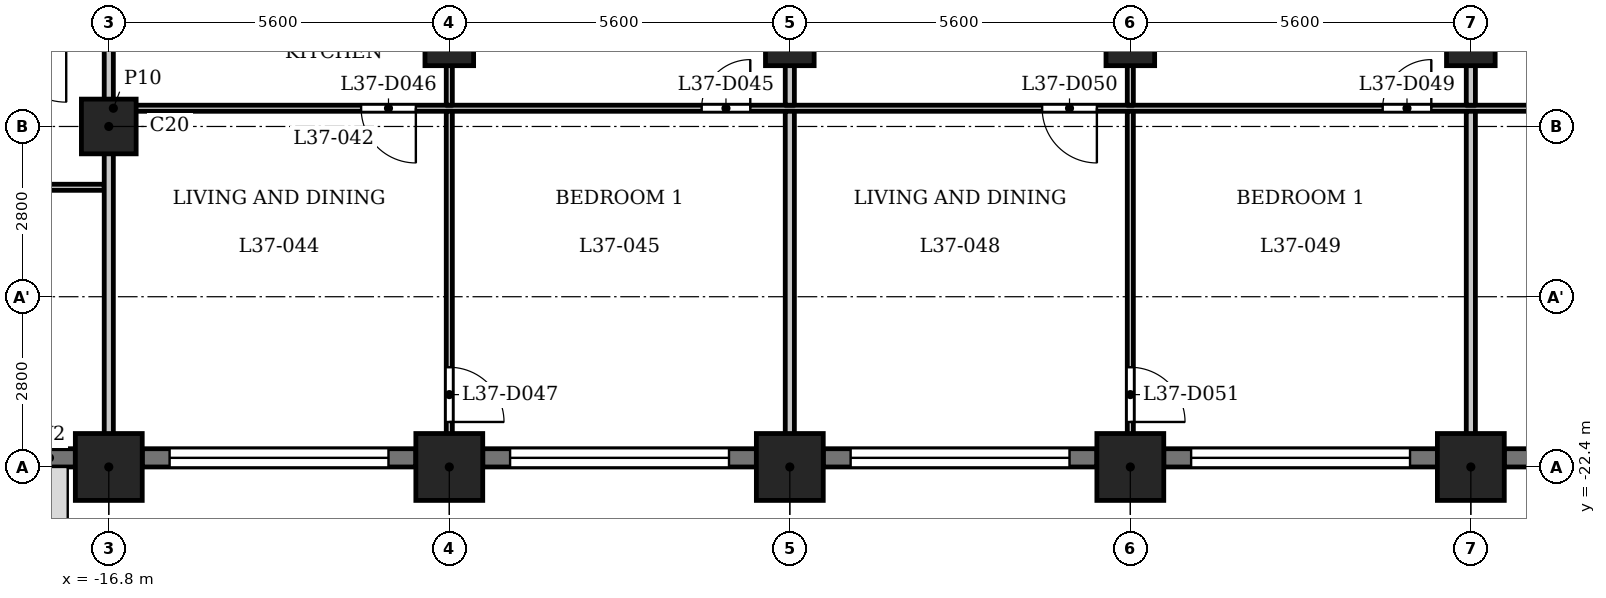
"""IFC4 building model, lengths in metres.
Left out: names, types, materials, properties, quantities, classifications, styles, units other than length and angle.
Written with IfcOpenShell. Run it as: python <this file> out.ifc"""

import sys

from ifc_helpers import new_model, si_unit, direction, frame, frame_2d, origin, origin_2d, place, context, subcontext, project, spatial, rectangle, extrude, element, fill, save


model = new_model("IFC4")
c1 = context("Model", 3, precision=1e-05, world=origin(), true_north=direction((0.0, 1.0)))
c2 = subcontext(c1, "Body", "Model", "MODEL_VIEW")
j1 = project(units=[si_unit("LENGTHUNIT", "METRE"), si_unit("PLANEANGLEUNIT", "RADIAN")], contexts=[c1])
p1 = place(None, origin())
s1 = spatial("IfcSite", under=j1, at=p1, CompositionType="ELEMENT")
p2 = place(p1, origin())
s2 = spatial("IfcBuilding", under=s1, at=p2, CompositionType="ELEMENT")
p3 = place(p2, frame((0.0, 0.0, 146.6)))
s3 = spatial("IfcBuildingStorey", under=s2, at=p3, CompositionType="ELEMENT", Elevation=146.6)
for number, where, z_axis, x_axis in (
    (1, (-16.8, -22.4, 0.0), (0.0, 0.0, 1.0), (1.0, 0.0, 0.0)),
    (2, (-11.2, -22.4, 0.0), (0.0, 0.0, 1.0), (1.0, 0.0, 0.0)),
    (3, (-5.6, -22.4, 0.0), (0.0, 0.0, 1.0), (1.0, 0.0, 0.0)),
    (4, (0.0, -22.4, 0.0), (0.0, 0.0, 1.0), (1.0, 0.0, 0.0)),
    (5, (5.6, -22.4, 0.0), (0.0, 0.0, 1.0), (1.0, 0.0, 0.0)),
):
    element("IfcColumn", number, at=place(p3, frame(where, z_axis=z_axis, x_axis=x_axis)), inside=s3, PredefinedType="COLUMN", context=c2, shape_type="SweptSolid", body=[
        extrude(rectangle(XDim=1.1, YDim=1.1, at=origin_2d()), origin(), (0.0, 0.0, 1.0), 3.5),
    ])
p4 = place(p3, frame((-16.8, -16.8, 0.0), z_axis=(0.0, 0.0, 1.0), x_axis=(1.0, 0.0, 0.0)))
e6 = element("IfcColumn", 6, at=p4, inside=s3, PredefinedType="COLUMN", context=c2, shape_type="SweptSolid", body=[
    extrude(rectangle(XDim=0.9, YDim=0.9, at=origin_2d()), origin(), (0.0, 0.0, 1.0), 3.5),
])
for number, where, z_axis, x_axis in (
    (7, (-11.2, -15.4, 0.0), (0.0, 0.0, 1.0), (1.0, 0.0, 0.0)),
    (8, (-5.6, -15.4, 0.0), (0.0, 0.0, 1.0), (1.0, 0.0, 0.0)),
    (9, (0.0, -15.4, 0.0), (0.0, 0.0, 1.0), (1.0, 0.0, 0.0)),
    (10, (5.6, -15.4, 0.0), (0.0, 0.0, 1.0), (1.0, 0.0, 0.0)),
):
    element("IfcColumn", number, at=place(p3, frame(where, z_axis=z_axis, x_axis=x_axis)), inside=s3, PredefinedType="COLUMN", context=c2, shape_type="SweptSolid", body=[
        extrude(rectangle(XDim=0.8, YDim=0.8, at=origin_2d()), origin(), (0.0, 0.0, 1.0), 3.5),
    ])
p5 = place(p3, frame((-20.0, -22.25, 0.0), z_axis=(0.0, 0.0, 1.0), x_axis=(1.0, 0.0, 0.0)))
e11 = element("IfcWall", 11, at=p5, inside=s3, PredefinedType="SOLIDWALL", context=c2, shape_type="SweptSolid", body=[
    extrude(rectangle(XDim=2.65, YDim=0.3, at=frame_2d((1.325, 0.0))), origin(), (0.0, 0.0, 1.0), 2.45),
])
p6 = place(p5, frame((0.425, 0.0, 0.9)))
e12 = element("IfcOpeningElement", 12, at=p6, cuts=e11, PredefinedType="OPENING", context=c2, shape_type="SweptSolid", body=[
    extrude(rectangle(XDim=1.8, YDim=1.25, at=frame_2d((0.9, 0.625))), frame((0.0, 0.16, 0.0), z_axis=(0.0, -1.0, 0.0), x_axis=(1.0, 0.0, 0.0)), (0.0, 0.0, 1.0), 0.32),
])
p7 = place(p3, frame((-16.25, -22.25, 0.0), z_axis=(0.0, 0.0, 1.0), x_axis=(1.0, 0.0, 0.0)))
e13 = element("IfcWall", 13, at=p7, inside=s3, PredefinedType="SOLIDWALL", context=c2, shape_type="SweptSolid", body=[
    extrude(rectangle(XDim=4.5, YDim=0.3, at=frame_2d((2.25, 0.0))), origin(), (0.0, 0.0, 1.0), 2.45),
])
p8 = place(p7, frame((0.45, 0.0, 1.2)))
e14 = element("IfcOpeningElement", 14, at=p8, cuts=e13, PredefinedType="OPENING", context=c2, shape_type="SweptSolid", body=[
    extrude(rectangle(XDim=3.6, YDim=0.95, at=frame_2d((1.8, 0.475))), frame((0.0, 0.16, 0.0), z_axis=(0.0, -1.0, 0.0), x_axis=(1.0, 0.0, 0.0)), (0.0, 0.0, 1.0), 0.32),
])
p9 = place(p3, frame((-10.65, -22.25, 0.0), z_axis=(0.0, 0.0, 1.0), x_axis=(1.0, 0.0, 0.0)))
e15 = element("IfcWall", 15, at=p9, inside=s3, PredefinedType="SOLIDWALL", context=c2, shape_type="SweptSolid", body=[
    extrude(rectangle(XDim=4.5, YDim=0.3, at=frame_2d((2.25, 0.0))), origin(), (0.0, 0.0, 1.0), 2.45),
])
p10 = place(p9, frame((0.45, 0.0, 1.2)))
e16 = element("IfcOpeningElement", 16, at=p10, cuts=e15, PredefinedType="OPENING", context=c2, shape_type="SweptSolid", body=[
    extrude(rectangle(XDim=3.6, YDim=0.95, at=frame_2d((1.8, 0.475))), frame((0.0, 0.16, 0.0), z_axis=(0.0, -1.0, 0.0), x_axis=(1.0, 0.0, 0.0)), (0.0, 0.0, 1.0), 0.32),
])
p11 = place(p3, frame((-5.05, -22.25, 0.0), z_axis=(0.0, 0.0, 1.0), x_axis=(1.0, 0.0, 0.0)))
e17 = element("IfcWall", 17, at=p11, inside=s3, PredefinedType="SOLIDWALL", context=c2, shape_type="SweptSolid", body=[
    extrude(rectangle(XDim=4.5, YDim=0.3, at=frame_2d((2.25, 0.0))), origin(), (0.0, 0.0, 1.0), 2.45),
])
p12 = place(p11, frame((0.45, 0.0, 1.2)))
e18 = element("IfcOpeningElement", 18, at=p12, cuts=e17, PredefinedType="OPENING", context=c2, shape_type="SweptSolid", body=[
    extrude(rectangle(XDim=3.6, YDim=0.95, at=frame_2d((1.8, 0.475))), frame((0.0, 0.16, 0.0), z_axis=(0.0, -1.0, 0.0), x_axis=(1.0, 0.0, 0.0)), (0.0, 0.0, 1.0), 0.32),
])
p13 = place(p3, frame((0.55, -22.25, 0.0), z_axis=(0.0, 0.0, 1.0), x_axis=(1.0, 0.0, 0.0)))
e19 = element("IfcWall", 19, at=p13, inside=s3, PredefinedType="SOLIDWALL", context=c2, shape_type="SweptSolid", body=[
    extrude(rectangle(XDim=4.5, YDim=0.3, at=frame_2d((2.25, 0.0))), origin(), (0.0, 0.0, 1.0), 2.45),
])
p14 = place(p13, frame((0.45, 0.0, 1.2)))
e20 = element("IfcOpeningElement", 20, at=p14, cuts=e19, PredefinedType="OPENING", context=c2, shape_type="SweptSolid", body=[
    extrude(rectangle(XDim=3.6, YDim=0.95, at=frame_2d((1.8, 0.475))), frame((0.0, 0.16, 0.0), z_axis=(0.0, -1.0, 0.0), x_axis=(1.0, 0.0, 0.0)), (0.0, 0.0, 1.0), 0.32),
])
p15 = place(p3, frame((6.15, -22.25, 0.0), z_axis=(0.0, 0.0, 1.0), x_axis=(1.0, 0.0, 0.0)))
e21 = element("IfcWall", 21, at=p15, inside=s3, PredefinedType="SOLIDWALL", context=c2, shape_type="SweptSolid", body=[
    extrude(rectangle(XDim=4.5, YDim=0.3, at=frame_2d((2.25, 0.0))), origin(), (0.0, 0.0, 1.0), 2.45),
])
p16 = place(p15, frame((0.45, 0.0, 1.2)))
e22 = element("IfcOpeningElement", 22, at=p16, cuts=e21, PredefinedType="OPENING", context=c2, shape_type="SweptSolid", body=[
    extrude(rectangle(XDim=3.6, YDim=0.95, at=frame_2d((1.8, 0.475))), frame((0.0, 0.16, 0.0), z_axis=(0.0, -1.0, 0.0), x_axis=(1.0, 0.0, 0.0)), (0.0, 0.0, 1.0), 0.32),
])
p17 = place(p3, frame((-26.394, -17.8, 0.0), z_axis=(0.0, 0.0, 1.0), x_axis=(1.0, 0.0, 0.0)))
e23 = element("IfcWall", 23, at=p17, inside=s3, PredefinedType="PARTITIONING", context=c2, shape_type="SweptSolid", body=[
    extrude(rectangle(XDim=9.519, YDim=0.1, at=frame_2d((4.76, 0.0))), origin(), (0.0, 0.0, 1.0), 3.2),
])
p18 = place(p17, frame((2.544, 0.0, 0.0)))
e24 = element("IfcOpeningElement", 24, at=p18, cuts=e23, PredefinedType="OPENING", context=c2, shape_type="SweptSolid", body=[
    extrude(rectangle(XDim=0.8, YDim=2.1, at=frame_2d((0.4, 1.05))), frame((0.0, 0.06, 0.0), z_axis=(0.0, -1.0, 0.0), x_axis=(1.0, 0.0, 0.0)), (0.0, 0.0, 1.0), 0.12),
])
p19 = place(p17, frame((6.894, 0.0, 0.0)))
e25 = element("IfcOpeningElement", 25, at=p19, cuts=e23, PredefinedType="OPENING", context=c2, shape_type="SweptSolid", body=[
    extrude(rectangle(XDim=0.9, YDim=2.1, at=frame_2d((0.45, 1.05))), frame((0.0, 0.06, 0.0), z_axis=(0.0, -1.0, 0.0), x_axis=(1.0, 0.0, 0.0)), (0.0, 0.0, 1.0), 0.12),
])
p20 = place(p3, frame((-16.725, -16.5, 0.0), z_axis=(0.0, 0.0, 1.0), x_axis=(1.0, 0.0, 0.0)))
e26 = element("IfcWall", 26, at=p20, inside=s3, PredefinedType="PARTITIONING", context=c2, shape_type="SweptSolid", body=[
    extrude(rectangle(XDim=33.45, YDim=0.1, at=frame_2d((16.725, 0.0))), origin(), (0.0, 0.0, 1.0), 3.2),
])
p21 = place(p20, frame((9.675, 0.0, 0.0)))
e27 = element("IfcOpeningElement", 27, at=p21, cuts=e26, PredefinedType="OPENING", context=c2, shape_type="SweptSolid", body=[
    extrude(rectangle(XDim=0.8, YDim=2.1, at=frame_2d((0.4, 1.05))), frame((0.0, 0.06, 0.0), z_axis=(0.0, -1.0, 0.0), x_axis=(1.0, 0.0, 0.0)), (0.0, 0.0, 1.0), 0.12),
])
p22 = place(p20, frame((4.075, 0.0, 0.0)))
e28 = element("IfcOpeningElement", 28, at=p22, cuts=e26, PredefinedType="OPENING", context=c2, shape_type="SweptSolid", body=[
    extrude(rectangle(XDim=0.9, YDim=2.1, at=frame_2d((0.45, 1.05))), frame((0.0, 0.06, 0.0), z_axis=(0.0, -1.0, 0.0), x_axis=(1.0, 0.0, 0.0)), (0.0, 0.0, 1.0), 0.12),
])
p23 = place(p20, frame((20.875, 0.0, 0.0)))
e29 = element("IfcOpeningElement", 29, at=p23, cuts=e26, PredefinedType="OPENING", context=c2, shape_type="SweptSolid", body=[
    extrude(rectangle(XDim=0.8, YDim=2.1, at=frame_2d((0.4, 1.05))), frame((0.0, 0.06, 0.0), z_axis=(0.0, -1.0, 0.0), x_axis=(1.0, 0.0, 0.0)), (0.0, 0.0, 1.0), 0.12),
])
p24 = place(p20, frame((15.275, 0.0, 0.0)))
e30 = element("IfcOpeningElement", 30, at=p24, cuts=e26, PredefinedType="OPENING", context=c2, shape_type="SweptSolid", body=[
    extrude(rectangle(XDim=0.9, YDim=2.1, at=frame_2d((0.45, 1.05))), frame((0.0, 0.06, 0.0), z_axis=(0.0, -1.0, 0.0), x_axis=(1.0, 0.0, 0.0)), (0.0, 0.0, 1.0), 0.12),
])
p25 = place(p20, frame((26.475, 0.0, 0.0)))
e31 = element("IfcOpeningElement", 31, at=p25, cuts=e26, PredefinedType="OPENING", context=c2, shape_type="SweptSolid", body=[
    extrude(rectangle(XDim=0.8, YDim=2.1, at=frame_2d((0.4, 1.05))), frame((0.0, 0.06, 0.0), z_axis=(0.0, -1.0, 0.0), x_axis=(1.0, 0.0, 0.0)), (0.0, 0.0, 1.0), 0.12),
])
p26 = place(p20, frame((30.575, 0.0, 0.0)))
e32 = element("IfcOpeningElement", 32, at=p26, cuts=e26, PredefinedType="OPENING", context=c2, shape_type="SweptSolid", body=[
    extrude(rectangle(XDim=0.9, YDim=2.1, at=frame_2d((0.45, 1.05))), frame((0.0, 0.06, 0.0), z_axis=(0.0, -1.0, 0.0), x_axis=(1.0, 0.0, 0.0)), (0.0, 0.0, 1.0), 0.12),
])
p27 = place(p3, frame((-16.8, -22.93, 0.0), z_axis=(0.0, 0.0, 1.0), x_axis=(0.0, 1.0, 0.0)))
e33 = element("IfcWall", 33, at=p27, inside=s3, PredefinedType="PARTITIONING", context=c2, shape_type="SweptSolid", body=[
    extrude(rectangle(XDim=7.455, YDim=0.15, at=frame_2d((3.728, 0.0))), origin(), (0.0, 0.0, 1.0), 3.2),
])
p28 = place(p3, frame((-11.2, -22.93, 0.0), z_axis=(0.0, 0.0, 1.0), x_axis=(0.0, 1.0, 0.0)))
e34 = element("IfcWall", 34, at=p28, inside=s3, PredefinedType="PARTITIONING", context=c2, shape_type="SweptSolid", body=[
    extrude(rectangle(XDim=6.38, YDim=0.1, at=frame_2d((3.19, 0.0))), origin(), (0.0, 0.0, 1.0), 3.2),
])
p29 = place(p28, frame((1.27, 0.0, 0.0)))
e35 = element("IfcOpeningElement", 35, at=p29, cuts=e34, PredefinedType="OPENING", context=c2, shape_type="SweptSolid", body=[
    extrude(rectangle(XDim=0.9, YDim=2.1, at=frame_2d((0.45, 1.05))), frame((0.0, 0.06, 0.0), z_axis=(0.0, -1.0, 0.0), x_axis=(1.0, 0.0, 0.0)), (0.0, 0.0, 1.0), 0.12),
])
p30 = place(p3, frame((-11.2, -16.45, 0.0), z_axis=(0.0, 0.0, 1.0), x_axis=(0.0, 1.0, 0.0)))
e36 = element("IfcWall", 36, at=p30, inside=s3, PredefinedType="PARTITIONING", context=c2, shape_type="SweptSolid", body=[
    extrude(rectangle(XDim=3.175, YDim=0.1, at=frame_2d((1.587, 0.0))), origin(), (0.0, 0.0, 1.0), 3.2),
])
p31 = place(p3, frame((-5.6, -22.93, 0.0), z_axis=(0.0, 0.0, 1.0), x_axis=(0.0, 1.0, 0.0)))
e37 = element("IfcWall", 37, at=p31, inside=s3, PredefinedType="PARTITIONING", context=c2, shape_type="SweptSolid", body=[
    extrude(rectangle(XDim=6.38, YDim=0.15, at=frame_2d((3.19, 0.0))), origin(), (0.0, 0.0, 1.0), 3.2),
])
p32 = place(p3, frame((-5.6, -16.45, 0.0), z_axis=(0.0, 0.0, 1.0), x_axis=(0.0, 1.0, 0.0)))
e38 = element("IfcWall", 38, at=p32, inside=s3, PredefinedType="PARTITIONING", context=c2, shape_type="SweptSolid", body=[
    extrude(rectangle(XDim=3.175, YDim=0.15, at=frame_2d((1.587, 0.0))), origin(), (0.0, 0.0, 1.0), 3.2),
])
p33 = place(p3, frame((0.0, -22.93, 0.0), z_axis=(0.0, 0.0, 1.0), x_axis=(0.0, 1.0, 0.0)))
e39 = element("IfcWall", 39, at=p33, inside=s3, PredefinedType="PARTITIONING", context=c2, shape_type="SweptSolid", body=[
    extrude(rectangle(XDim=6.38, YDim=0.1, at=frame_2d((3.19, 0.0))), origin(), (0.0, 0.0, 1.0), 3.2),
])
p34 = place(p33, frame((1.27, 0.0, 0.0)))
e40 = element("IfcOpeningElement", 40, at=p34, cuts=e39, PredefinedType="OPENING", context=c2, shape_type="SweptSolid", body=[
    extrude(rectangle(XDim=0.9, YDim=2.1, at=frame_2d((0.45, 1.05))), frame((0.0, 0.06, 0.0), z_axis=(0.0, -1.0, 0.0), x_axis=(1.0, 0.0, 0.0)), (0.0, 0.0, 1.0), 0.12),
])
p35 = place(p3, frame((0.0, -16.45, 0.0), z_axis=(0.0, 0.0, 1.0), x_axis=(0.0, 1.0, 0.0)))
e41 = element("IfcWall", 41, at=p35, inside=s3, PredefinedType="PARTITIONING", context=c2, shape_type="SweptSolid", body=[
    extrude(rectangle(XDim=3.175, YDim=0.1, at=frame_2d((1.587, 0.0))), origin(), (0.0, 0.0, 1.0), 3.2),
])
p36 = place(p3, frame((5.6, -22.93, 0.0), z_axis=(0.0, 0.0, 1.0), x_axis=(0.0, 1.0, 0.0)))
e42 = element("IfcWall", 42, at=p36, inside=s3, PredefinedType="PARTITIONING", context=c2, shape_type="SweptSolid", body=[
    extrude(rectangle(XDim=6.38, YDim=0.15, at=frame_2d((3.19, 0.0))), origin(), (0.0, 0.0, 1.0), 3.2),
])
p37 = place(p3, frame((5.6, -16.45, 0.0), z_axis=(0.0, 0.0, 1.0), x_axis=(0.0, 1.0, 0.0)))
e43 = element("IfcWall", 43, at=p37, inside=s3, PredefinedType="PARTITIONING", context=c2, shape_type="SweptSolid", body=[
    extrude(rectangle(XDim=3.175, YDim=0.15, at=frame_2d((1.587, 0.0))), origin(), (0.0, 0.0, 1.0), 3.2),
])
p38 = place(p21, origin())
e44 = element("IfcDoor", 44, at=p38, inside=s3, OperationType="SINGLE_SWING_LEFT", PredefinedType="DOOR", context=c2, shape_type="SweptSolid", body=[
    extrude(rectangle(XDim=0.8, YDim=2.1, at=frame_2d((0.4, 1.05))), frame((0.0, 0.025, 0.0), z_axis=(0.0, -1.0, 0.0), x_axis=(1.0, 0.0, 0.0)), (0.0, 0.0, 1.0), 0.05),
])
fill(e27, e44)
p39 = place(p22, origin())
e45 = element("IfcDoor", 45, at=p39, inside=s3, OperationType="SINGLE_SWING_RIGHT", PredefinedType="DOOR", context=c2, shape_type="SweptSolid", body=[
    extrude(rectangle(XDim=0.9, YDim=2.1, at=frame_2d((0.45, 1.05))), frame((0.0, 0.025, 0.0), z_axis=(0.0, -1.0, 0.0), x_axis=(1.0, 0.0, 0.0)), (0.0, 0.0, 1.0), 0.05),
])
fill(e28, e45)
p40 = place(p29, origin())
e46 = element("IfcDoor", 46, at=p40, inside=s3, OperationType="SINGLE_SWING_LEFT", PredefinedType="DOOR", context=c2, shape_type="SweptSolid", body=[
    extrude(rectangle(XDim=0.9, YDim=2.1, at=frame_2d((0.45, 1.05))), frame((0.0, 0.025, 0.0), z_axis=(0.0, -1.0, 0.0), x_axis=(1.0, 0.0, 0.0)), (0.0, 0.0, 1.0), 0.05),
])
fill(e35, e46)
p41 = place(p23, origin())
e47 = element("IfcDoor", 47, at=p41, inside=s3, OperationType="SINGLE_SWING_LEFT", PredefinedType="DOOR", context=c2, shape_type="SweptSolid", body=[
    extrude(rectangle(XDim=0.8, YDim=2.1, at=frame_2d((0.4, 1.05))), frame((0.0, 0.025, 0.0), z_axis=(0.0, -1.0, 0.0), x_axis=(1.0, 0.0, 0.0)), (0.0, 0.0, 1.0), 0.05),
])
fill(e29, e47)
p42 = place(p24, origin())
e48 = element("IfcDoor", 48, at=p42, inside=s3, OperationType="SINGLE_SWING_RIGHT", PredefinedType="DOOR", context=c2, shape_type="SweptSolid", body=[
    extrude(rectangle(XDim=0.9, YDim=2.1, at=frame_2d((0.45, 1.05))), frame((0.0, 0.025, 0.0), z_axis=(0.0, -1.0, 0.0), x_axis=(1.0, 0.0, 0.0)), (0.0, 0.0, 1.0), 0.05),
])
fill(e30, e48)
p43 = place(p34, origin())
e49 = element("IfcDoor", 49, at=p43, inside=s3, OperationType="SINGLE_SWING_LEFT", PredefinedType="DOOR", context=c2, shape_type="SweptSolid", body=[
    extrude(rectangle(XDim=0.9, YDim=2.1, at=frame_2d((0.45, 1.05))), frame((0.0, 0.025, 0.0), z_axis=(0.0, -1.0, 0.0), x_axis=(1.0, 0.0, 0.0)), (0.0, 0.0, 1.0), 0.05),
])
fill(e40, e49)
p44 = place(p8, origin())
e50 = element("IfcWindow", 50, at=p44, inside=s3, PartitioningType="SINGLE_PANEL", PredefinedType="WINDOW", context=c2, shape_type="SweptSolid", body=[
    extrude(rectangle(XDim=3.6, YDim=0.95, at=frame_2d((1.8, 0.475))), frame((0.0, 0.03, 0.0), z_axis=(0.0, -1.0, 0.0), x_axis=(1.0, 0.0, 0.0)), (0.0, 0.0, 1.0), 0.06),
])
fill(e14, e50)
p45 = place(p10, origin())
e51 = element("IfcWindow", 51, at=p45, inside=s3, PartitioningType="SINGLE_PANEL", PredefinedType="WINDOW", context=c2, shape_type="SweptSolid", body=[
    extrude(rectangle(XDim=3.6, YDim=0.95, at=frame_2d((1.8, 0.475))), frame((0.0, 0.03, 0.0), z_axis=(0.0, -1.0, 0.0), x_axis=(1.0, 0.0, 0.0)), (0.0, 0.0, 1.0), 0.06),
])
fill(e16, e51)
p46 = place(p12, origin())
e52 = element("IfcWindow", 52, at=p46, inside=s3, PartitioningType="SINGLE_PANEL", PredefinedType="WINDOW", context=c2, shape_type="SweptSolid", body=[
    extrude(rectangle(XDim=3.6, YDim=0.95, at=frame_2d((1.8, 0.475))), frame((0.0, 0.03, 0.0), z_axis=(0.0, -1.0, 0.0), x_axis=(1.0, 0.0, 0.0)), (0.0, 0.0, 1.0), 0.06),
])
fill(e18, e52)
p47 = place(p14, origin())
e53 = element("IfcWindow", 53, at=p47, inside=s3, PartitioningType="SINGLE_PANEL", PredefinedType="WINDOW", context=c2, shape_type="SweptSolid", body=[
    extrude(rectangle(XDim=3.6, YDim=0.95, at=frame_2d((1.8, 0.475))), frame((0.0, 0.03, 0.0), z_axis=(0.0, -1.0, 0.0), x_axis=(1.0, 0.0, 0.0)), (0.0, 0.0, 1.0), 0.06),
])
fill(e20, e53)
save(model, sys.argv[1])
